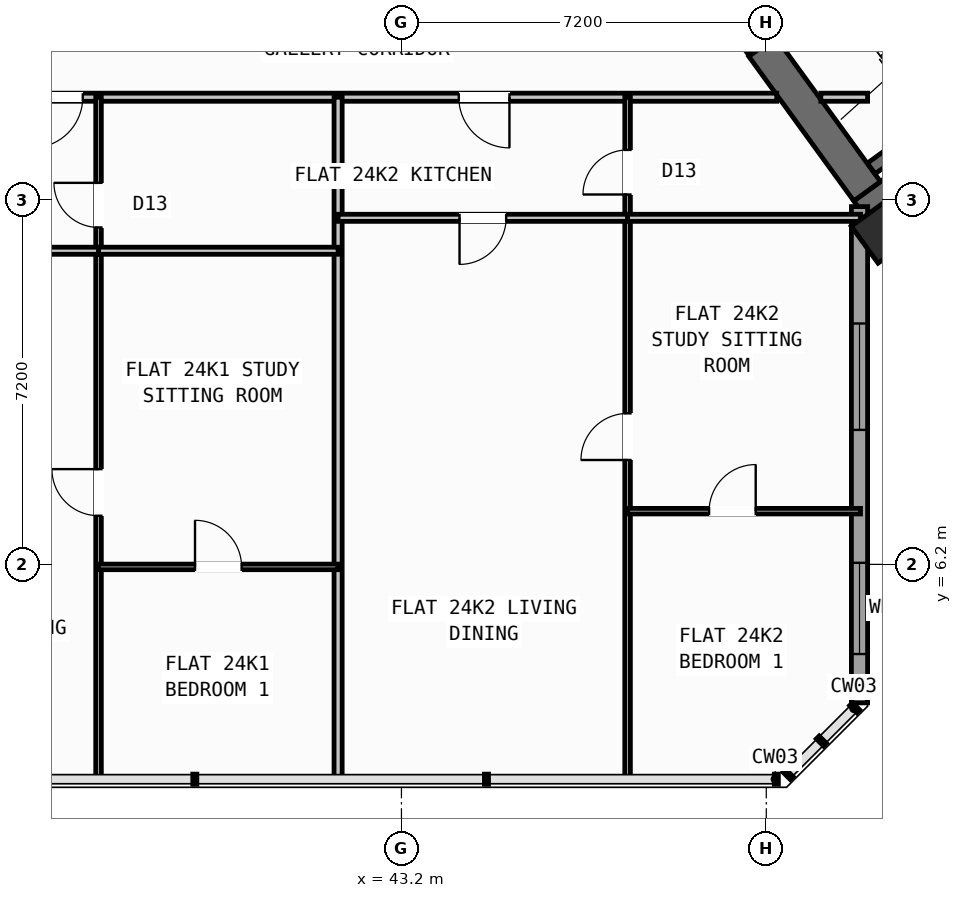
"""IFC4 building model, lengths in metres.
Left out: names, types, materials, properties, quantities, classifications, styles, units other than length and angle.
Written with IfcOpenShell. Run it as: python <this file> out.ifc"""

import sys

from ifc_helpers import new_model, si_unit, direction, frame, frame_2d, origin, origin_2d, place, context, subcontext, project, spatial, rectangle, hollow_rectangle, extrude, source, transform, mapped, element, fill, save


model = new_model("IFC4")
c1 = context("Model", 3, precision=1e-05, world=origin(), true_north=direction((0.0, 1.0)))
c2 = subcontext(c1, "Body", "Model", "MODEL_VIEW")
j1 = project(units=[si_unit("LENGTHUNIT", "METRE"), si_unit("PLANEANGLEUNIT", "RADIAN")], contexts=[c1])
p1 = place(None, origin())
s1 = spatial("IfcSite", under=j1, at=p1, CompositionType="ELEMENT")
p2 = place(p1, origin())
s2 = spatial("IfcBuilding", under=s1, at=p2, CompositionType="ELEMENT")
p3 = place(p2, frame((0.0, 0.0, 97.2)))
s3 = spatial("IfcBuildingStorey", under=s2, at=p3, CompositionType="ELEMENT", Elevation=97.2)
p4 = place(p3, frame((36.683, 18.304, 0.0), z_axis=(0.0, 0.0, 1.0), x_axis=(-0.529899109053, -0.848060690178, 0.0)))
e1 = element("IfcWall", 1, at=p4, inside=s3, PredefinedType="SHEAR", context=c2, shape_type="SweptSolid", body=[
    extrude(rectangle(XDim=6.375, YDim=0.65, at=frame_2d((3.188, 0.0))), origin(), (0.0, 0.0, 1.0), 3.32),
])
p5 = place(p3, frame((52.318, 13.11, 0.0), z_axis=(0.0, 0.0, 1.0), x_axis=(0.809019445368, 0.587781878776, 0.0)))
e2 = element("IfcWall", 2, at=p5, inside=s3, PredefinedType="SHEAR", context=c2, shape_type="SweptSolid", body=[
    extrude(rectangle(XDim=12.44, YDim=0.65, at=frame_2d((6.22, 0.0))), origin(), (0.0, 0.0, 1.0), 3.32),
])
p6 = place(p3, frame((52.39, 13.564, 0.0), z_axis=(0.0, 0.0, 1.0), x_axis=(-0.58779688989, 0.809008539037, 0.0)))
e3 = element("IfcWall", 3, at=p6, inside=s3, PredefinedType="SHEAR", context=c2, shape_type="SweptSolid", body=[
    extrude(rectangle(XDim=3.525, YDim=0.65, at=frame_2d((1.763, 0.0))), origin(), (0.0, 0.0, 1.0), 3.32),
])
m1 = source(origin(), c2, "Body", "SweptSolid", [
    extrude(hollow_rectangle(XDim=0.9, YDim=0.9, WallThickness=0.036, at=origin_2d()), origin(), (0.0, 0.0, 1.0), 3.6),
])
p7 = place(p3, frame((52.705, 12.773, 0.0), z_axis=(0.0, 0.0, 1.0), x_axis=(0.809016994375, 0.587785252292, 0.0)))
e4 = element("IfcColumn", 4, at=p7, inside=s3, PredefinedType="COLUMN", context=c2, shape_type="MappedRepresentation", body=[
    mapped(m1, transform((0.0, 0.0, 0.0), scale=1.0)),
])
p8 = place(p3, frame((52.24, 13.261, 0.0), z_axis=(0.0, 0.0, 1.0), x_axis=(0.0, -1.0, 0.0)))
e5 = element("IfcWall", 5, at=p8, inside=s3, PredefinedType="STANDARD", context=c2, shape_type="SweptSolid", body=[
    extrude(rectangle(XDim=9.795, YDim=0.32, at=frame_2d((4.897, 0.0))), origin(), (0.0, 0.0, 1.0), 3.32),
])
p9 = place(p8, frame((2.307, 0.0, 0.8)))
e6 = element("IfcOpeningElement", 6, at=p9, cuts=e5, PredefinedType="OPENING", context=c2, shape_type="SweptSolid", body=[
    extrude(rectangle(XDim=2.1, YDim=1.55, at=frame_2d((1.05, 0.775))), frame((0.0, 0.17, 0.0), z_axis=(0.0, -1.0, 0.0), x_axis=(1.0, 0.0, 0.0)), (0.0, 0.0, 1.0), 0.34),
])
p10 = place(p8, frame((7.03, 0.0, 0.85)))
e7 = element("IfcOpeningElement", 7, at=p10, cuts=e5, PredefinedType="OPENING", context=c2, shape_type="SweptSolid", body=[
    extrude(rectangle(XDim=1.8, YDim=1.5, at=frame_2d((0.9, 0.75))), frame((0.0, 0.17, 0.0), z_axis=(0.0, -1.0, 0.0), x_axis=(1.0, 0.0, 0.0)), (0.0, 0.0, 1.0), 0.34),
])
p11 = place(p3, frame((52.472, 14.013, 0.0), z_axis=(0.0, 0.0, 1.0), x_axis=(0.809028366311, 0.587769599847, 0.0)))
e8 = element("IfcWall", 8, at=p11, inside=s3, PredefinedType="SHEAR", context=c2, shape_type="SweptSolid", body=[
    extrude(rectangle(XDim=7.33, YDim=0.26, at=frame_2d((3.665, 0.0))), origin(), (0.0, 0.0, 1.0), 3.32),
])
p12 = place(p3, frame((35.296, 15.42, 0.0), z_axis=(0.0, 0.0, 1.0), x_axis=(1.0, 0.0, 0.0)))
e9 = element("IfcWall", 9, at=p12, inside=s3, PredefinedType="PARTITIONING", context=c2, shape_type="SweptSolid", body=[
    extrude(rectangle(XDim=15.311, YDim=0.16, at=frame_2d((7.655, 0.0))), origin(), (0.0, 0.0, 1.0), 3.31),
])
p13 = place(p12, frame((0.615, 0.0, 0.0)))
e10 = element("IfcOpeningElement", 10, at=p13, cuts=e9, PredefinedType="OPENING", context=c2, shape_type="SweptSolid", body=[
    extrude(rectangle(XDim=1.0, YDim=2.1, at=frame_2d((0.5, 1.05))), frame((0.0, 0.09, 0.0), z_axis=(0.0, -1.0, 0.0), x_axis=(1.0, 0.0, 0.0)), (0.0, 0.0, 1.0), 0.18),
])
p14 = place(p12, frame((9.035, 0.0, 0.0)))
e11 = element("IfcOpeningElement", 11, at=p14, cuts=e9, PredefinedType="OPENING", context=c2, shape_type="SweptSolid", body=[
    extrude(rectangle(XDim=1.0, YDim=2.1, at=frame_2d((0.5, 1.05))), frame((0.0, 0.09, 0.0), z_axis=(0.0, -1.0, 0.0), x_axis=(1.0, 0.0, 0.0)), (0.0, 0.0, 1.0), 0.18),
])
p15 = place(p3, frame((51.477, 15.42, 0.0), z_axis=(0.0, 0.0, 1.0), x_axis=(1.0, 0.0, 0.0)))
e12 = element("IfcWall", 12, at=p15, inside=s3, PredefinedType="PARTITIONING", context=c2, shape_type="SweptSolid", body=[
    extrude(rectangle(XDim=0.923, YDim=0.16, at=frame_2d((0.461, 0.0))), origin(), (0.0, 0.0, 1.0), 3.31),
])
p16 = place(p3, frame((50.119, 16.333, 0.0), z_axis=(0.0, 0.0, 1.0), x_axis=(-0.587749856981, 0.809042709391, 0.0)))
e13 = element("IfcWall", 13, at=p16, inside=s3, PredefinedType="STANDARD", context=c2, shape_type="SweptSolid", body=[
    extrude(rectangle(XDim=2.96, YDim=0.2, at=frame_2d((1.48, 0.0))), origin(), (0.0, 0.0, 1.0), 3.31),
])
p17 = place(p16, frame((0.53, 0.0, 0.0)))
e14 = element("IfcOpeningElement", 14, at=p17, cuts=e13, PredefinedType="OPENING", context=c2, shape_type="SweptSolid", body=[
    extrude(rectangle(XDim=1.5, YDim=2.15, at=frame_2d((0.75, 1.075))), frame((0.0, 0.11, 0.0), z_axis=(0.0, -1.0, 0.0), x_axis=(1.0, 0.0, 0.0)), (0.0, 0.0, 1.0), 0.22),
])
p18 = place(p3, frame((41.95, 1.96, 0.0), z_axis=(0.0, 0.0, 1.0), x_axis=(0.0, 1.0, 0.0)))
e15 = element("IfcWall", 15, at=p18, inside=s3, PredefinedType="PARTITIONING", context=c2, shape_type="SweptSolid", body=[
    extrude(rectangle(XDim=13.46, YDim=0.16, at=frame_2d((6.73, 0.0))), origin(), (0.0, 0.0, 1.0), 3.31),
])
p19 = place(p3, frame((37.222, 1.96, 0.0), z_axis=(0.0, 0.0, 1.0), x_axis=(0.0, 1.0, 0.0)))
e16 = element("IfcWall", 16, at=p19, inside=s3, PredefinedType="PARTITIONING", context=c2, shape_type="SweptSolid", body=[
    extrude(rectangle(XDim=13.46, YDim=0.11, at=frame_2d((6.73, 0.0))), origin(), (0.0, 0.0, 1.0), 3.31),
])
p20 = place(p19, frame((5.2, 0.0, 0.0)))
e17 = element("IfcOpeningElement", 17, at=p20, cuts=e16, PredefinedType="OPENING", context=c2, shape_type="SweptSolid", body=[
    extrude(rectangle(XDim=0.92, YDim=2.08, at=frame_2d((0.46, 1.04))), frame((0.0, 0.065, 0.0), z_axis=(0.0, -1.0, 0.0), x_axis=(1.0, 0.0, 0.0)), (0.0, 0.0, 1.0), 0.13),
])
p21 = place(p19, frame((10.89, 0.0, 0.0)))
e18 = element("IfcOpeningElement", 18, at=p21, cuts=e16, PredefinedType="OPENING", context=c2, shape_type="SweptSolid", body=[
    extrude(rectangle(XDim=0.88, YDim=2.08, at=frame_2d((0.44, 1.04))), frame((0.0, 0.065, 0.0), z_axis=(0.0, -1.0, 0.0), x_axis=(1.0, 0.0, 0.0)), (0.0, 0.0, 1.0), 0.13),
])
p22 = place(p3, frame((33.433, 12.39, 0.0), z_axis=(0.0, 0.0, 1.0), x_axis=(1.0, 0.0, 0.0)))
e19 = element("IfcWall", 19, at=p22, inside=s3, PredefinedType="PLUMBINGWALL", context=c2, shape_type="SweptSolid", body=[
    extrude(rectangle(XDim=3.789, YDim=0.14, at=frame_2d((1.895, 0.0))), origin(), (0.0, 0.0, 1.0), 2.495),
])
p23 = place(p22, frame((0.768, 0.0, 0.0)))
e20 = element("IfcOpeningElement", 20, at=p23, cuts=e19, PredefinedType="OPENING", context=c2, shape_type="SweptSolid", body=[
    extrude(rectangle(XDim=0.92, YDim=2.08, at=frame_2d((0.46, 1.04))), frame((0.0, 0.08, 0.0), z_axis=(0.0, -1.0, 0.0), x_axis=(1.0, 0.0, 0.0)), (0.0, 0.0, 1.0), 0.16),
])
p24 = place(p3, frame((37.222, 12.39, 0.0), z_axis=(0.0, 0.0, 1.0), x_axis=(1.0, 0.0, 0.0)))
e21 = element("IfcWall", 21, at=p24, inside=s3, PredefinedType="PLUMBINGWALL", context=c2, shape_type="SweptSolid", body=[
    extrude(rectangle(XDim=4.728, YDim=0.14, at=frame_2d((2.364, 0.0))), origin(), (0.0, 0.0, 1.0), 2.495),
])
p25 = place(p3, frame((37.222, 6.15, 0.0), z_axis=(0.0, 0.0, 1.0), x_axis=(1.0, 0.0, 0.0)))
e22 = element("IfcWall", 22, at=p25, inside=s3, PredefinedType="PARTITIONING", context=c2, shape_type="SweptSolid", body=[
    extrude(rectangle(XDim=4.728, YDim=0.11, at=frame_2d((2.364, 0.0))), origin(), (0.0, 0.0, 1.0), 3.31),
])
p26 = place(p25, frame((1.904, 0.0, 0.0)))
e23 = element("IfcOpeningElement", 23, at=p26, cuts=e22, PredefinedType="OPENING", context=c2, shape_type="SweptSolid", body=[
    extrude(rectangle(XDim=0.92, YDim=2.08, at=frame_2d((0.46, 1.04))), frame((0.0, 0.065, 0.0), z_axis=(0.0, -1.0, 0.0), x_axis=(1.0, 0.0, 0.0)), (0.0, 0.0, 1.0), 0.13),
])
p27 = place(p3, frame((47.663, 1.96, 0.0), z_axis=(0.0, 0.0, 1.0), x_axis=(0.0, 1.0, 0.0)))
e24 = element("IfcWall", 24, at=p27, inside=s3, PredefinedType="PARTITIONING", context=c2, shape_type="SweptSolid", body=[
    extrude(rectangle(XDim=13.46, YDim=0.11, at=frame_2d((6.73, 0.0))), origin(), (0.0, 0.0, 1.0), 3.31),
])
p28 = place(p27, frame((6.3, 0.0, 0.0)))
e25 = element("IfcOpeningElement", 25, at=p28, cuts=e24, PredefinedType="OPENING", context=c2, shape_type="SweptSolid", body=[
    extrude(rectangle(XDim=0.92, YDim=2.08, at=frame_2d((0.46, 1.04))), frame((0.0, 0.065, 0.0), z_axis=(0.0, -1.0, 0.0), x_axis=(1.0, 0.0, 0.0)), (0.0, 0.0, 1.0), 0.13),
])
p29 = place(p27, frame((11.54, 0.0, 0.0)))
e26 = element("IfcOpeningElement", 26, at=p29, cuts=e24, PredefinedType="OPENING", context=c2, shape_type="SweptSolid", body=[
    extrude(rectangle(XDim=0.88, YDim=2.08, at=frame_2d((0.44, 1.04))), frame((0.0, 0.065, 0.0), z_axis=(0.0, -1.0, 0.0), x_axis=(1.0, 0.0, 0.0)), (0.0, 0.0, 1.0), 0.13),
])
p30 = place(p3, frame((41.95, 13.04, 0.0), z_axis=(0.0, 0.0, 1.0), x_axis=(1.0, 0.0, 0.0)))
e27 = element("IfcWall", 27, at=p30, inside=s3, PredefinedType="PLUMBINGWALL", context=c2, shape_type="SweptSolid", body=[
    extrude(rectangle(XDim=5.713, YDim=0.14, at=frame_2d((2.856, 0.0))), origin(), (0.0, 0.0, 1.0), 3.31),
])
p31 = place(p30, frame((2.396, 0.0, 0.0)))
e28 = element("IfcOpeningElement", 28, at=p31, cuts=e27, PredefinedType="OPENING", context=c2, shape_type="SweptSolid", body=[
    extrude(rectangle(XDim=0.92, YDim=2.08, at=frame_2d((0.46, 1.04))), frame((0.0, 0.08, 0.0), z_axis=(0.0, -1.0, 0.0), x_axis=(1.0, 0.0, 0.0)), (0.0, 0.0, 1.0), 0.16),
])
p32 = place(p3, frame((47.663, 13.04, 0.0), z_axis=(0.0, 0.0, 1.0), x_axis=(1.0, 0.0, 0.0)))
e29 = element("IfcWall", 29, at=p32, inside=s3, PredefinedType="PLUMBINGWALL", context=c2, shape_type="SweptSolid", body=[
    extrude(rectangle(XDim=4.597, YDim=0.14, at=frame_2d((2.298, 0.0))), origin(), (0.0, 0.0, 1.0), 2.495),
])
p33 = place(p3, frame((47.663, 7.25, 0.0), z_axis=(0.0, 0.0, 1.0), x_axis=(1.0, 0.0, 0.0)))
e30 = element("IfcWall", 30, at=p33, inside=s3, PredefinedType="PARTITIONING", context=c2, shape_type="SweptSolid", body=[
    extrude(rectangle(XDim=4.597, YDim=0.11, at=frame_2d((2.298, 0.0))), origin(), (0.0, 0.0, 1.0), 3.31),
])
p34 = place(p33, frame((1.608, 0.0, 0.0)))
e31 = element("IfcOpeningElement", 31, at=p34, cuts=e30, PredefinedType="OPENING", context=c2, shape_type="SweptSolid", body=[
    extrude(rectangle(XDim=0.92, YDim=2.08, at=frame_2d((0.46, 1.04))), frame((0.0, 0.065, 0.0), z_axis=(0.0, -1.0, 0.0), x_axis=(1.0, 0.0, 0.0)), (0.0, 0.0, 1.0), 0.13),
])
m2 = source(origin(), c2, "Body", "SweptSolid", [
    extrude(rectangle(XDim=2.1, YDim=1.55, at=frame_2d((1.05, 0.775))), frame((0.0, 0.03, 0.0), z_axis=(0.0, -1.0, 0.0), x_axis=(1.0, 0.0, 0.0)), (0.0, 0.0, 1.0), 0.06),
])
p35 = place(p9, origin())
e32 = element("IfcWindow", 32, at=p35, inside=s3, PartitioningType="SINGLE_PANEL", PredefinedType="WINDOW", context=c2, shape_type="MappedRepresentation", body=[
    mapped(m2, transform((0.0, 0.0, 0.0), scale=1.0)),
])
fill(e6, e32)
m3 = source(origin(), c2, "Body", "SweptSolid", [
    extrude(rectangle(XDim=1.8, YDim=1.5, at=frame_2d((0.9, 0.75))), frame((0.0, 0.03, 0.0), z_axis=(0.0, -1.0, 0.0), x_axis=(1.0, 0.0, 0.0)), (0.0, 0.0, 1.0), 0.06),
])
p36 = place(p10, origin())
e33 = element("IfcWindow", 33, at=p36, inside=s3, PartitioningType="SINGLE_PANEL", PredefinedType="WINDOW", context=c2, shape_type="MappedRepresentation", body=[
    mapped(m3, transform((0.0, 0.0, 0.0), scale=1.0)),
])
fill(e7, e33)
m4 = source(origin(), c2, "Body", "SweptSolid", [
    extrude(rectangle(XDim=0.92, YDim=2.08, at=frame_2d((0.46, 1.04))), frame((0.0, 0.025, 0.0), z_axis=(0.0, -1.0, 0.0), x_axis=(1.0, 0.0, 0.0)), (0.0, 0.0, 1.0), 0.05),
])
p37 = place(p20, origin())
e34 = element("IfcDoor", 34, at=p37, inside=s3, OperationType="SINGLE_SWING_RIGHT", PredefinedType="DOOR", context=c2, shape_type="MappedRepresentation", body=[
    mapped(m4, transform((0.0, 0.0, 0.0), scale=1.0)),
])
fill(e17, e34)
p38 = place(p26, origin())
e35 = element("IfcDoor", 35, at=p38, inside=s3, OperationType="SINGLE_SWING_LEFT", PredefinedType="DOOR", context=c2, shape_type="MappedRepresentation", body=[
    mapped(m4, transform((0.0, 0.0, 0.0), scale=1.0)),
])
fill(e23, e35)
m5 = source(origin(), c2, "Body", "SweptSolid", [
    extrude(rectangle(XDim=1.0, YDim=2.1, at=frame_2d((0.5, 1.05))), frame((0.0, 0.025, 0.0), z_axis=(0.0, -1.0, 0.0), x_axis=(1.0, 0.0, 0.0)), (0.0, 0.0, 1.0), 0.05),
])
p39 = place(p13, frame((1.0, 0.0, 0.0), z_axis=(0.0, 0.0, 1.0), x_axis=(-1.0, 0.0, 0.0)))
e36 = element("IfcDoor", 36, at=p39, inside=s3, OperationType="SINGLE_SWING_RIGHT", PredefinedType="DOOR", context=c2, shape_type="MappedRepresentation", body=[
    mapped(m5, transform((0.0, 0.0, 0.0), scale=1.0)),
])
fill(e10, e36)
m6 = source(origin(), c2, "Body", "SweptSolid", [
    extrude(rectangle(XDim=0.88, YDim=2.08, at=frame_2d((0.44, 1.04))), frame((0.0, 0.025, 0.0), z_axis=(0.0, -1.0, 0.0), x_axis=(1.0, 0.0, 0.0)), (0.0, 0.0, 1.0), 0.05),
])
p40 = place(p21, origin())
e37 = element("IfcDoor", 37, at=p40, inside=s3, OperationType="SINGLE_SWING_RIGHT", PredefinedType="DOOR", context=c2, shape_type="MappedRepresentation", body=[
    mapped(m6, transform((0.0, 0.0, 0.0), scale=1.0)),
])
fill(e18, e37)
p41 = place(p28, origin())
e38 = element("IfcDoor", 38, at=p41, inside=s3, OperationType="SINGLE_SWING_LEFT", PredefinedType="DOOR", context=c2, shape_type="MappedRepresentation", body=[
    mapped(m4, transform((0.0, 0.0, 0.0), scale=1.0)),
])
fill(e25, e38)
p42 = place(p34, origin())
e39 = element("IfcDoor", 39, at=p42, inside=s3, OperationType="SINGLE_SWING_RIGHT", PredefinedType="DOOR", context=c2, shape_type="MappedRepresentation", body=[
    mapped(m4, transform((0.0, 0.0, 0.0), scale=1.0)),
])
fill(e31, e39)
p43 = place(p14, frame((1.0, 0.0, 0.0), z_axis=(0.0, 0.0, 1.0), x_axis=(-1.0, 0.0, 0.0)))
e40 = element("IfcDoor", 40, at=p43, inside=s3, OperationType="SINGLE_SWING_LEFT", PredefinedType="DOOR", context=c2, shape_type="MappedRepresentation", body=[
    mapped(m5, transform((0.0, 0.0, 0.0), scale=1.0)),
])
fill(e11, e40)
p44 = place(p31, frame((0.92, 0.0, 0.0), z_axis=(0.0, 0.0, 1.0), x_axis=(-1.0, 0.0, 0.0)))
e41 = element("IfcDoor", 41, at=p44, inside=s3, OperationType="SINGLE_SWING_RIGHT", PredefinedType="DOOR", context=c2, shape_type="MappedRepresentation", body=[
    mapped(m4, transform((0.0, 0.0, 0.0), scale=1.0)),
])
fill(e28, e41)
p45 = place(p29, origin())
e42 = element("IfcDoor", 42, at=p45, inside=s3, OperationType="SINGLE_SWING_LEFT", PredefinedType="DOOR", context=c2, shape_type="MappedRepresentation", body=[
    mapped(m6, transform((0.0, 0.0, 0.0), scale=1.0)),
])
fill(e26, e42)
save(model, sys.argv[1])
